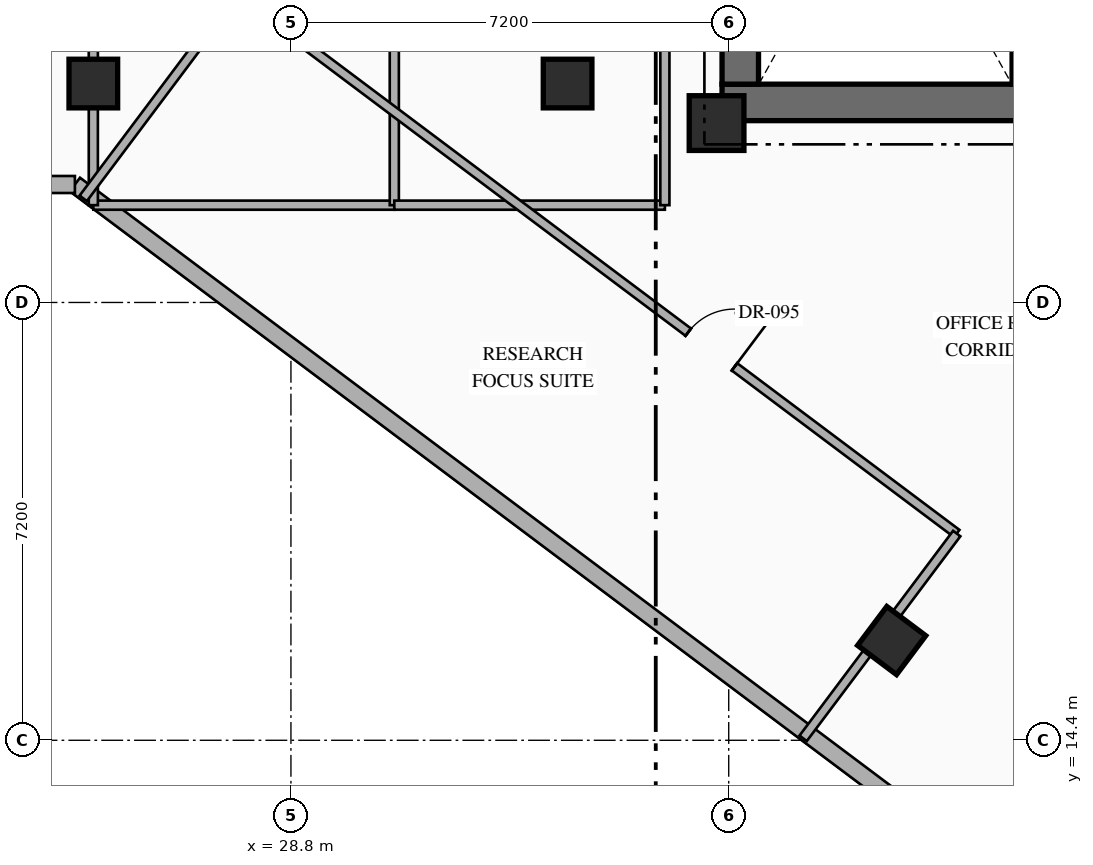
"""IFC4 building model, lengths in metres.
Left out: names, types, materials, properties, quantities, classifications, styles, units other than length and angle.
Written with IfcOpenShell. Run it as: python <this file> out.ifc"""

import sys

from ifc_helpers import new_model, si_unit, direction, frame, frame_2d, origin, origin_2d, place, context, subcontext, project, spatial, rectangle, hollow_rectangle, extrude, element, fill, save


model = new_model("IFC4")
c1 = context("Model", 3, precision=1e-05, world=origin(), true_north=direction((0.0, 1.0)))
c2 = subcontext(c1, "Body", "Model", "MODEL_VIEW")
j1 = project(units=[si_unit("LENGTHUNIT", "METRE"), si_unit("PLANEANGLEUNIT", "RADIAN")], contexts=[c1])
p1 = place(None, origin())
s1 = spatial("IfcSite", under=j1, at=p1, CompositionType="ELEMENT")
p2 = place(p1, origin())
s2 = spatial("IfcBuilding", under=s1, at=p2, CompositionType="ELEMENT")
p3 = place(p2, frame((0.0, 0.0, 163.65)))
s3 = spatial("IfcBuildingStorey", under=s2, at=p3, CompositionType="ELEMENT", Elevation=163.65)
p4 = place(p3, frame((35.89, 24.89, 0.0), z_axis=(0.0, 0.0, 1.0), x_axis=(1.0, 0.0, 0.0)))
e1 = element("IfcWall", 1, at=p4, inside=s3, PredefinedType="SHEAR", context=c2, shape_type="SweptSolid", body=[
    extrude(rectangle(XDim=7.76, YDim=0.6, at=frame_2d((3.88, 0.0))), origin(), (0.0, 0.0, 1.0), 3.6),
])
p5 = place(p3, frame((36.19, 25.19, 0.0), z_axis=(0.0, 0.0, 1.0), x_axis=(0.0, 1.0, 0.0)))
e2 = element("IfcWall", 2, at=p5, inside=s3, PredefinedType="SHEAR", context=c2, shape_type="SweptSolid", body=[
    extrude(rectangle(XDim=9.48, YDim=0.6, at=frame_2d((4.74, 0.0))), origin(), (0.0, 0.0, 1.0), 3.6),
])
p6 = place(p3, frame((40.81, 25.19, 0.0), z_axis=(0.0, 0.0, 1.0), x_axis=(0.0, 1.0, 0.0)))
e3 = element("IfcWall", 3, at=p6, inside=s3, PredefinedType="SHEAR", context=c2, shape_type="SweptSolid", body=[
    extrude(rectangle(XDim=9.48, YDim=0.3, at=frame_2d((4.74, 0.0))), origin(), (0.0, 0.0, 1.0), 3.6),
])
p7 = place(p3, frame((35.8, 24.55, 0.0), z_axis=(0.0, 0.0, 1.0), x_axis=(1.0, 0.0, 0.0)))
e4 = element("IfcColumn", 4, at=p7, inside=s3, PredefinedType="COLUMN", context=c2, shape_type="SweptSolid", body=[
    extrude(rectangle(XDim=0.9, YDim=0.9, at=origin_2d()), origin(), (0.0, 0.0, 1.0), 3.6),
])
for number, where, z_axis, x_axis in (
    (5, (25.55, 25.2, 0.0), (0.0, 0.0, 1.0), (1.0, 0.0, 0.0)),
    (6, (33.35, 25.2, 0.0), (0.0, 0.0, 1.0), (1.0, 0.0, 0.0)),
    (7, (38.68, 16.04, 0.0), (0.0, 0.0, 1.0), (0.8, -0.6, 0.0)),
):
    element("IfcColumn", number, at=place(p3, frame(where, z_axis=z_axis, x_axis=x_axis)), inside=s3, PredefinedType="COLUMN", context=c2, shape_type="SweptSolid", body=[
        extrude(hollow_rectangle(XDim=0.8, YDim=0.8, WallThickness=0.032, at=origin_2d()), origin(), (0.0, 0.0, 1.0), 3.6),
    ])
p8 = place(p3, frame((44.918, 8.787, 0.0), z_axis=(0.0, 0.0, 1.0), x_axis=(-0.800004765927, 0.599993645378, 0.0)))
e8 = element("IfcWall", 8, at=p8, inside=s3, PredefinedType="STANDARD", context=c2, shape_type="SweptSolid", body=[
    extrude(rectangle(XDim=24.588, YDim=0.28, at=frame_2d((12.294, 0.0))), origin(), (0.0, 0.0, 1.0), 3.35),
])
p9 = place(p3, frame((25.247, 23.54, 0.0), z_axis=(0.0, 0.0, 1.0), x_axis=(-1.0, 0.0, 0.0)))
e9 = element("IfcWall", 9, at=p9, inside=s3, PredefinedType="STANDARD", context=c2, shape_type="SweptSolid", body=[
    extrude(rectangle(XDim=6.747, YDim=0.28, at=frame_2d((3.374, 0.0))), origin(), (0.0, 0.0, 1.0), 3.35),
])
p10 = place(p3, frame((25.55, 23.2, 0.0), z_axis=(0.0, 0.0, 1.0), x_axis=(1.0, 0.0, 0.0)))
e10 = element("IfcWall", 10, at=p10, inside=s3, PredefinedType="PARTITIONING", context=c2, shape_type="SweptSolid", body=[
    extrude(rectangle(XDim=4.95, YDim=0.15, at=frame_2d((2.475, 0.0))), origin(), (0.0, 0.0, 1.0), 3.35),
])
p11 = place(p3, frame((25.55, 23.2, 0.0), z_axis=(0.0, 0.0, 1.0), x_axis=(0.0, 1.0, 0.0)))
e11 = element("IfcWall", 11, at=p11, inside=s3, PredefinedType="PARTITIONING", context=c2, shape_type="SweptSolid", body=[
    extrude(rectangle(XDim=7.15, YDim=0.15, at=frame_2d((3.575, 0.0))), origin(), (0.0, 0.0, 1.0), 2.695),
])
p12 = place(p3, frame((30.5, 23.2, 0.0), z_axis=(0.0, 0.0, 1.0), x_axis=(0.0, 1.0, 0.0)))
e12 = element("IfcWall", 12, at=p12, inside=s3, PredefinedType="PARTITIONING", context=c2, shape_type="SweptSolid", body=[
    extrude(rectangle(XDim=7.15, YDim=0.15, at=frame_2d((3.575, 0.0))), origin(), (0.0, 0.0, 1.0), 3.35),
])
p13 = place(p3, frame((30.5, 23.2, 0.0), z_axis=(0.0, 0.0, 1.0), x_axis=(1.0, 0.0, 0.0)))
e13 = element("IfcWall", 13, at=p13, inside=s3, PredefinedType="PARTITIONING", context=c2, shape_type="SweptSolid", body=[
    extrude(rectangle(XDim=4.45, YDim=0.15, at=frame_2d((2.225, 0.0))), origin(), (0.0, 0.0, 1.0), 3.35),
])
p14 = place(p3, frame((34.95, 23.2, 0.0), z_axis=(0.0, 0.0, 1.0), x_axis=(0.0, 1.0, 0.0)))
e14 = element("IfcWall", 14, at=p14, inside=s3, PredefinedType="PARTITIONING", context=c2, shape_type="SweptSolid", body=[
    extrude(rectangle(XDim=7.15, YDim=0.15, at=frame_2d((3.575, 0.0))), origin(), (0.0, 0.0, 1.0), 3.35),
])
p15 = place(p3, frame((27.91, 26.68, 0.0), z_axis=(0.0, 0.0, 1.0), x_axis=(0.800005938517, -0.599992081896, 0.0)))
e15 = element("IfcWall", 15, at=p15, inside=s3, PredefinedType="PARTITIONING", context=c2, shape_type="SweptSolid", body=[
    extrude(rectangle(XDim=14.8, YDim=0.15, at=frame_2d((7.4, 0.0))), origin(), (0.0, 0.0, 1.0), 3.35),
])
p16 = place(p15, frame((9.281, 0.0, 0.0)))
e16 = element("IfcOpeningElement", 16, at=p16, cuts=e15, PredefinedType="OPENING", context=c2, shape_type="SweptSolid", body=[
    extrude(rectangle(XDim=0.95, YDim=2.15, at=frame_2d((0.475, 1.075))), frame((0.0, 0.085, 0.0), z_axis=(0.0, -1.0, 0.0), x_axis=(1.0, 0.0, 0.0)), (0.0, 0.0, 1.0), 0.17),
])
p17 = place(p3, frame((25.384, 23.312, 0.0), z_axis=(0.0, 0.0, 1.0), x_axis=(0.599990721155, 0.80000695905, 0.0)))
e17 = element("IfcWall", 17, at=p17, inside=s3, PredefinedType="PARTITIONING", context=c2, shape_type="SweptSolid", body=[
    extrude(rectangle(XDim=4.21, YDim=0.15, at=frame_2d((2.105, 0.0))), origin(), (0.0, 0.0, 1.0), 3.35),
])
p18 = place(p3, frame((37.224, 14.432, 0.0), z_axis=(0.0, 0.0, 1.0), x_axis=(0.599962885857, 0.800027834262, 0.0)))
e18 = element("IfcWall", 18, at=p18, inside=s3, PredefinedType="PARTITIONING", context=c2, shape_type="SweptSolid", body=[
    extrude(rectangle(XDim=4.21, YDim=0.15, at=frame_2d((2.105, 0.0))), origin(), (0.0, 0.0, 1.0), 2.695),
])
p19 = place(p16, origin())
e19 = element("IfcDoor", 19, at=p19, inside=s3, OperationType="SINGLE_SWING_RIGHT", PredefinedType="DOOR", context=c2, shape_type="SweptSolid", body=[
    extrude(rectangle(XDim=0.95, YDim=2.15, at=frame_2d((0.475, 1.075))), frame((0.0, 0.025, 0.0), z_axis=(0.0, -1.0, 0.0), x_axis=(1.0, 0.0, 0.0)), (0.0, 0.0, 1.0), 0.05),
])
fill(e16, e19)
save(model, sys.argv[1])
